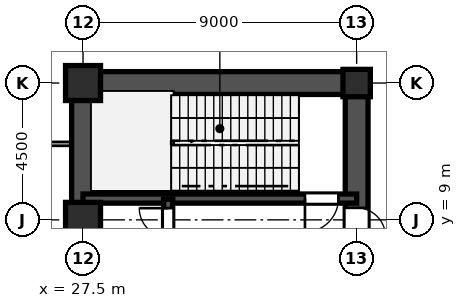
"""IFC4 building model, lengths in metres.
Left out: names, types, materials, properties, quantities, classifications, styles, units other than length and angle.
Written with IfcOpenShell. Run it as: python <this file> out.ifc"""

import sys

from ifc_helpers import new_model, si_unit, direction, frame, frame_2d, origin, origin_2d, place, context, subcontext, project, spatial, rectangle, hollow_rectangle, i_section, extrude, source, transform, mapped, element, fill, save


model = new_model("IFC4")
c1 = context("Model", 3, precision=1e-05, world=origin(), true_north=direction((0.0, 1.0)))
c2 = subcontext(c1, "Body", "Model", "MODEL_VIEW")
j1 = project(units=[si_unit("LENGTHUNIT", "METRE"), si_unit("PLANEANGLEUNIT", "RADIAN")], contexts=[c1])
p1 = place(None, origin())
s1 = spatial("IfcSite", under=j1, at=p1, CompositionType="ELEMENT")
p2 = place(p1, origin())
s2 = spatial("IfcBuilding", under=s1, at=p2, CompositionType="ELEMENT")
p3 = place(p2, origin())
s3 = spatial("IfcBuildingStorey", under=s2, at=p3, CompositionType="ELEMENT", Elevation=0.0)
m1 = source(origin(), c2, "Body", "SweptSolid", [
    extrude(hollow_rectangle(XDim=1.15, YDim=1.15, WallThickness=0.048, at=origin_2d()), origin(), (0.0, 0.0, 1.0), 5.4),
])
for number, where, z_axis, x_axis in (
    (1, (27.5, 9.0, 0.0), (0.0, 0.0, 1.0), (1.0, 0.0, 0.0)),
    (2, (27.5, 13.5, 0.0), (0.0, 0.0, 1.0), (1.0, 0.0, 0.0)),
):
    element("IfcColumn", number, at=place(p3, frame(where, z_axis=z_axis, x_axis=x_axis)), inside=s3, PredefinedType="COLUMN", context=c2, shape_type="MappedRepresentation", body=[
        mapped(m1, transform((0.0, 0.0, 0.0), scale=1.0)),
    ])
m2 = source(origin(), c2, "Body", "SweptSolid", [
    extrude(i_section(OverallWidth=0.9, OverallDepth=0.9, WebThickness=0.036, FlangeThickness=0.055, at=origin_2d()), origin(), (0.0, 0.0, 1.0), 5.4),
])
p4 = place(p3, frame((36.5, 13.5, 0.0), z_axis=(0.0, 0.0, 1.0), x_axis=(1.0, 0.0, 0.0)))
e3 = element("IfcColumn", 3, at=p4, inside=s3, PredefinedType="COLUMN", context=c2, shape_type="MappedRepresentation", body=[
    mapped(m2, transform((0.0, 0.0, 0.0), scale=1.0)),
])
p5 = place(p3, frame((27.5, 1.3, 0.0), z_axis=(0.0, 0.0, 1.0), x_axis=(0.0, 1.0, 0.0)))
e4 = element("IfcWall", 4, at=p5, inside=s3, PredefinedType="SHEAR", context=c2, shape_type="SweptSolid", body=[
    extrude(rectangle(XDim=12.2, YDim=0.75, at=frame_2d((6.1, 0.0))), origin(), (0.0, 0.0, 1.0), 5.12),
])
p6 = place(p3, frame((27.5, 13.5, 0.0), z_axis=(0.0, 0.0, 1.0), x_axis=(1.0, 0.0, 0.0)))
e5 = element("IfcWall", 5, at=p6, inside=s3, PredefinedType="SHEAR", context=c2, shape_type="SweptSolid", body=[
    extrude(rectangle(XDim=9.0, YDim=0.75, at=frame_2d((4.5, 0.0))), origin(), (0.0, 0.0, 1.0), 5.12),
])
p7 = place(p3, frame((36.5, 8.2, 0.0), z_axis=(0.0, 0.0, 1.0), x_axis=(0.0, 1.0, 0.0)))
e6 = element("IfcWall", 6, at=p7, inside=s3, PredefinedType="SHEAR", context=c2, shape_type="SweptSolid", body=[
    extrude(rectangle(XDim=5.45, YDim=0.75, at=frame_2d((2.725, 0.0))), origin(), (0.0, 0.0, 1.0), 5.12),
])
p8 = place(p7, frame((0.245, 0.0, 0.0)))
e7 = element("IfcOpeningElement", 7, at=p8, cuts=e6, PredefinedType="OPENING", context=c2, shape_type="SweptSolid", body=[
    extrude(rectangle(XDim=0.95, YDim=2.15, at=frame_2d((0.475, 1.075))), frame((0.0, 0.385, 0.0), z_axis=(0.0, -1.0, 0.0), x_axis=(1.0, 0.0, 0.0)), (0.0, 0.0, 1.0), 0.77),
])
p9 = place(p3, frame((27.5, 9.7, 0.0), z_axis=(0.0, 0.0, 1.0), x_axis=(1.0, 0.0, 0.0)))
e8 = element("IfcWall", 8, at=p9, inside=s3, PredefinedType="SHEAR", context=c2, shape_type="SweptSolid", body=[
    extrude(rectangle(XDim=9.0, YDim=0.3, at=frame_2d((4.5, 0.0))), origin(), (0.0, 0.0, 1.0), 5.12),
])
p10 = place(p9, frame((7.3, 0.0, 0.0)))
e9 = element("IfcOpeningElement", 9, at=p10, cuts=e8, PredefinedType="OPENING", context=c2, shape_type="SweptSolid", body=[
    extrude(rectangle(XDim=1.1, YDim=2.2, at=frame_2d((0.55, 1.1))), frame((0.0, 0.16, 0.0), z_axis=(0.0, -1.0, 0.0), x_axis=(1.0, 0.0, 0.0)), (0.0, 0.0, 1.0), 0.32),
])
p11 = place(p3, frame((30.3, 8.15, 0.0), z_axis=(0.0, 0.0, 1.0), x_axis=(0.0, 1.0, 0.0)))
e10 = element("IfcWall", 10, at=p11, inside=s3, PredefinedType="SHEAR", context=c2, shape_type="SweptSolid", body=[
    extrude(rectangle(XDim=1.53, YDim=0.3, at=frame_2d((0.765, 0.0))), origin(), (0.0, 0.0, 1.0), 5.12),
])
p12 = place(p11, frame((0.285, 0.0, 0.0)))
e11 = element("IfcOpeningElement", 11, at=p12, cuts=e10, PredefinedType="OPENING", context=c2, shape_type="SweptSolid", body=[
    extrude(rectangle(XDim=0.95, YDim=2.15, at=frame_2d((0.475, 1.075))), frame((0.0, 0.16, 0.0), z_axis=(0.0, -1.0, 0.0), x_axis=(1.0, 0.0, 0.0)), (0.0, 0.0, 1.0), 0.32),
])
p13 = place(p3, frame((18.585, 11.5, 0.0), z_axis=(0.0, 0.0, 1.0), x_axis=(1.0, 0.0, 0.0)))
e12 = element("IfcWall", 12, at=p13, inside=s3, PredefinedType="PARTITIONING", context=c2, shape_type="SweptSolid", body=[
    extrude(rectangle(XDim=8.535, YDim=0.13, at=frame_2d((4.268, 0.0))), origin(), (0.0, 0.0, 1.0), 5.12),
])
m3 = source(origin(), c2, "Body", "SweptSolid", [
    extrude(rectangle(XDim=0.95, YDim=2.15, at=frame_2d((0.475, 1.075))), frame((0.0, 0.025, 0.0), z_axis=(0.0, -1.0, 0.0), x_axis=(1.0, 0.0, 0.0)), (0.0, 0.0, 1.0), 0.05),
])
p14 = place(p8, frame((0.95, 0.0, 0.0), z_axis=(0.0, 0.0, 1.0), x_axis=(-1.0, 0.0, 0.0)))
e13 = element("IfcDoor", 13, at=p14, inside=s3, OperationType="SINGLE_SWING_LEFT", PredefinedType="DOOR", context=c2, shape_type="MappedRepresentation", body=[
    mapped(m3, transform((0.0, 0.0, 0.0), scale=1.0)),
])
fill(e7, e13)
m4 = source(origin(), c2, "Body", "SweptSolid", [
    extrude(rectangle(XDim=1.1, YDim=2.2, at=frame_2d((0.55, 1.1))), frame((0.0, 0.025, 0.0), z_axis=(0.0, -1.0, 0.0), x_axis=(1.0, 0.0, 0.0)), (0.0, 0.0, 1.0), 0.05),
])
p15 = place(p10, frame((1.1, 0.0, 0.0), z_axis=(0.0, 0.0, 1.0), x_axis=(-1.0, 0.0, 0.0)))
e14 = element("IfcDoor", 14, at=p15, inside=s3, OperationType="SINGLE_SWING_LEFT", PredefinedType="DOOR", context=c2, shape_type="MappedRepresentation", body=[
    mapped(m4, transform((0.0, 0.0, 0.0), scale=1.0)),
])
fill(e9, e14)
p16 = place(p12, origin())
e15 = element("IfcDoor", 15, at=p16, inside=s3, OperationType="SINGLE_SWING_RIGHT", PredefinedType="DOOR", context=c2, shape_type="MappedRepresentation", body=[
    mapped(m3, transform((0.0, 0.0, 0.0), scale=1.0)),
])
fill(e11, e15)
save(model, sys.argv[1])
